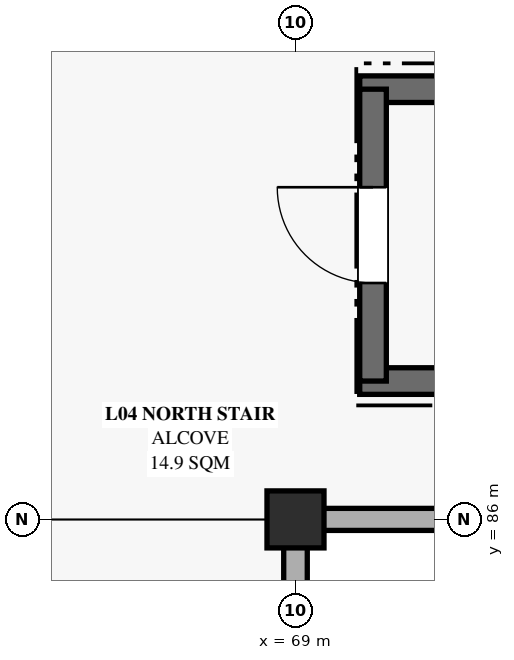
"""IFC4 building model, lengths in metres.
Left out: names, types, materials, properties, quantities, classifications, styles, units other than length and angle.
Written with IfcOpenShell. Run it as: python <this file> out.ifc"""

import sys

from ifc_helpers import new_model, si_unit, direction, frame, frame_2d, origin, origin_2d, place, context, subcontext, project, spatial, rectangle, extrude, element, fill, save


model = new_model("IFC4")
c1 = context("Model", 3, precision=1e-05, world=origin(), true_north=direction((0.0, 1.0)))
c2 = subcontext(c1, "Body", "Model", "MODEL_VIEW")
j1 = project(units=[si_unit("LENGTHUNIT", "METRE"), si_unit("PLANEANGLEUNIT", "RADIAN")], contexts=[c1])
p1 = place(None, origin())
s1 = spatial("IfcSite", under=j1, at=p1, CompositionType="ELEMENT")
p2 = place(p1, origin())
s2 = spatial("IfcBuilding", under=s1, at=p2, CompositionType="ELEMENT")
p3 = place(p2, frame((0.0, 0.0, 19.8)))
s3 = spatial("IfcBuildingStorey", under=s2, at=p3, CompositionType="ELEMENT", Elevation=19.8)
p4 = place(p3, frame((69.0, 86.0, 0.0), z_axis=(0.0, 0.0, 1.0), x_axis=(1.0, 0.0, 0.0)))
e1 = element("IfcColumn", 1, at=p4, inside=s3, PredefinedType="COLUMN", context=c2, shape_type="SweptSolid", body=[
    extrude(rectangle(XDim=0.75, YDim=0.75, at=origin_2d()), origin(), (0.0, 0.0, 1.0), 4.5),
])
p5 = place(p3, frame((69.0, 85.64, 0.0), z_axis=(0.0, 0.0, 1.0), x_axis=(0.0, -1.0, 0.0)))
e2 = element("IfcWall", 2, at=p5, inside=s3, PredefinedType="SOLIDWALL", context=c2, shape_type="SweptSolid", body=[
    extrude(rectangle(XDim=6.48, YDim=0.31, at=frame_2d((3.24, 0.0))), origin(), (0.0, 0.0, 1.0), 3.0),
])
p6 = place(p5, frame((2.39, 0.0, 0.85)))
e3 = element("IfcOpeningElement", 3, at=p6, cuts=e2, PredefinedType="OPENING", context=c2, shape_type="SweptSolid", body=[
    extrude(rectangle(XDim=1.7, YDim=2.0, at=frame_2d((0.85, 1.0))), frame((0.0, 0.165, 0.0), z_axis=(0.0, -1.0, 0.0), x_axis=(1.0, 0.0, 0.0)), (0.0, 0.0, 1.0), 0.33),
])
p7 = place(p3, frame((75.84, 86.0, 0.0), z_axis=(0.0, 0.0, 1.0), x_axis=(-1.0, 0.0, 0.0)))
e4 = element("IfcWall", 4, at=p7, inside=s3, PredefinedType="SOLIDWALL", context=c2, shape_type="SweptSolid", body=[
    extrude(rectangle(XDim=6.48, YDim=0.29, at=frame_2d((3.24, 0.0))), origin(), (0.0, 0.0, 1.0), 3.0),
])
p8 = place(p7, frame((2.59, 0.0, 0.85)))
e5 = element("IfcOpeningElement", 5, at=p8, cuts=e4, PredefinedType="OPENING", context=c2, shape_type="SweptSolid", body=[
    extrude(rectangle(XDim=1.3, YDim=1.9, at=frame_2d((0.65, 0.95))), frame((0.0, 0.155, 0.0), z_axis=(0.0, -1.0, 0.0), x_axis=(1.0, 0.0, 0.0)), (0.0, 0.0, 1.0), 0.31),
])
for number, where, z_axis, x_axis in (
    (6, (77.855, 87.82, 0.0), (0.0, 0.0, 1.0), (-1.0, 0.0, 0.0)),
    (7, (69.845, 91.66, 0.0), (0.0, 0.0, 1.0), (1.0, 0.0, 0.0)),
):
    element("IfcWall", number, at=place(p3, frame(where, z_axis=z_axis, x_axis=x_axis)), inside=s3, PredefinedType="SHEAR", context=c2, shape_type="SweptSolid", body=[
        extrude(rectangle(XDim=8.01, YDim=0.35, at=frame_2d((4.005, 0.0))), origin(), (0.0, 0.0, 1.0), 4.23),
    ])
p9 = place(p3, frame((70.02, 87.82, 0.0), z_axis=(0.0, 0.0, 1.0), x_axis=(0.0, 1.0, 0.0)))
e8 = element("IfcWall", 8, at=p9, inside=s3, PredefinedType="SHEAR", context=c2, shape_type="SweptSolid", body=[
    extrude(rectangle(XDim=3.84, YDim=0.35, at=frame_2d((1.92, 0.0))), origin(), (0.0, 0.0, 1.0), 4.23),
])
p10 = place(p9, frame((1.29, 0.0, 0.0)))
e9 = element("IfcOpeningElement", 9, at=p10, cuts=e8, PredefinedType="OPENING", context=c2, shape_type="SweptSolid", body=[
    extrude(rectangle(XDim=1.26, YDim=2.12, at=frame_2d((0.63, 1.06))), frame((0.0, 0.185, 0.0), z_axis=(0.0, -1.0, 0.0), x_axis=(1.0, 0.0, 0.0)), (0.0, 0.0, 1.0), 0.37),
])
p11 = place(p10, origin())
e10 = element("IfcDoor", 10, at=p11, inside=s3, OperationType="SINGLE_SWING_RIGHT", PredefinedType="DOOR", context=c2, shape_type="SweptSolid", body=[
    extrude(rectangle(XDim=1.26, YDim=2.12, at=frame_2d((0.63, 1.06))), frame((0.0, 0.025, 0.0), z_axis=(0.0, -1.0, 0.0), x_axis=(1.0, 0.0, 0.0)), (0.0, 0.0, 1.0), 0.05),
])
fill(e9, e10)
save(model, sys.argv[1])
